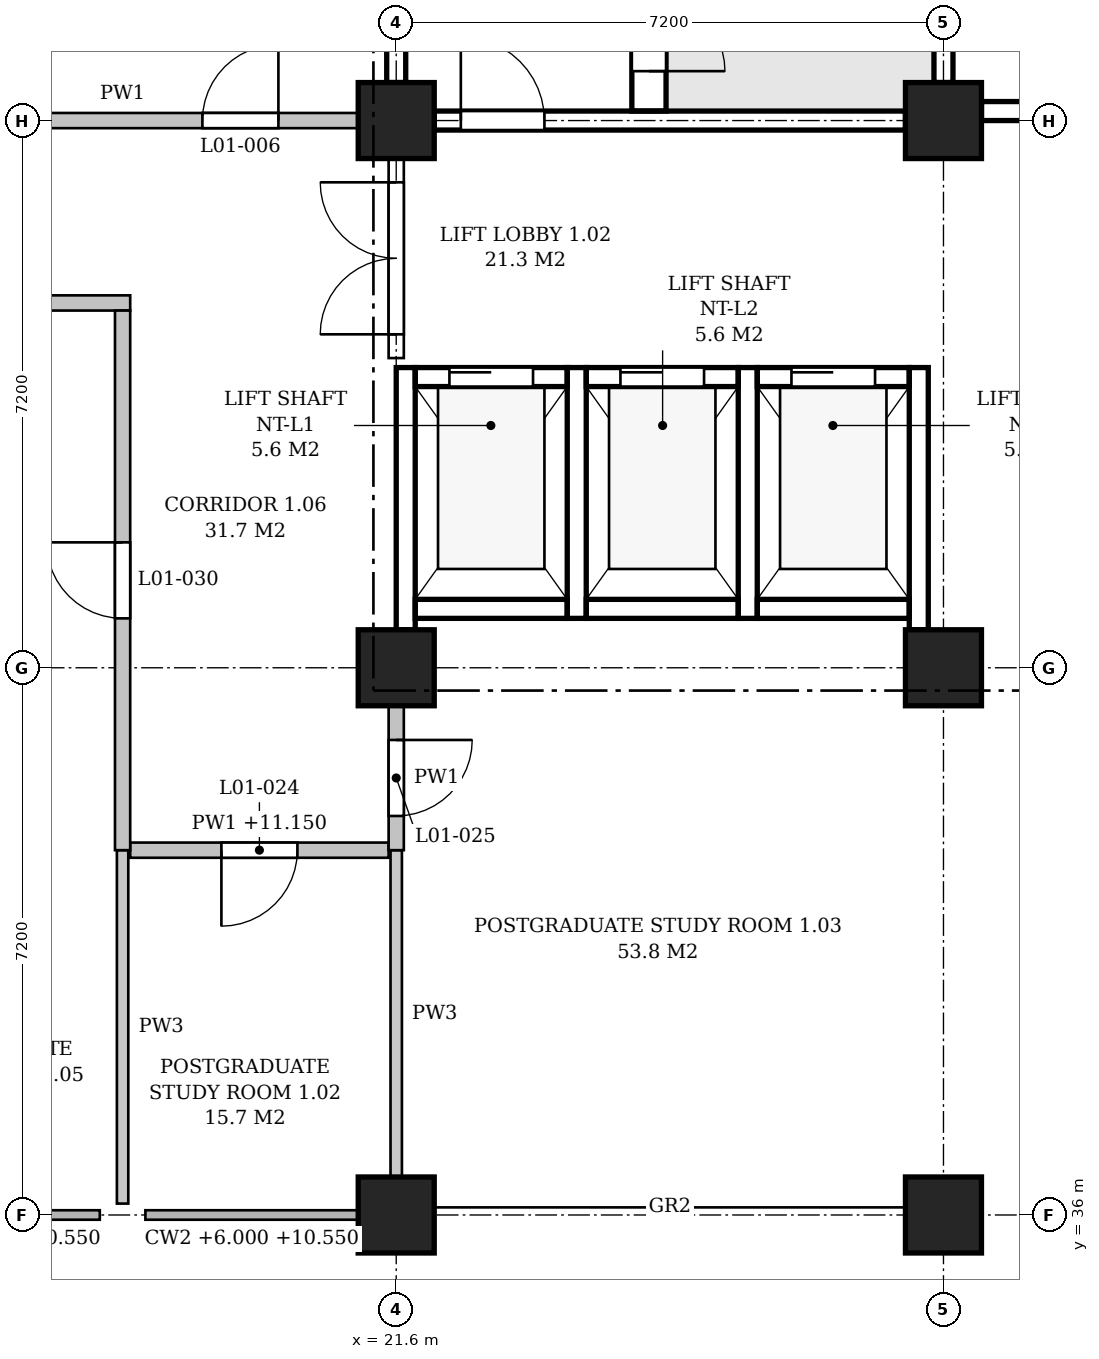
"""IFC4 building model, lengths in metres.
Left out: names, types, materials, properties, quantities, classifications, styles, units other than length and angle.
Written with IfcOpenShell. Run it as: python <this file> out.ifc"""

import sys

from ifc_helpers import new_model, si_unit, direction, frame, frame_2d, origin, origin_2d, place, context, subcontext, project, spatial, polyline, rectangle, outline, extrude, element, fill, save


model = new_model("IFC4")
c1 = context("Model", 3, precision=1e-05, world=origin(), true_north=direction((0.0, 1.0)))
c2 = subcontext(c1, "Body", "Model", "MODEL_VIEW")
j1 = project(units=[si_unit("LENGTHUNIT", "METRE"), si_unit("PLANEANGLEUNIT", "RADIAN")], contexts=[c1])
p1 = place(None, origin())
s1 = spatial("IfcSite", under=j1, at=p1, CompositionType="ELEMENT")
p2 = place(p1, origin())
s2 = spatial("IfcBuilding", under=s1, at=p2, CompositionType="ELEMENT")
p3 = place(p2, frame((0.0, 0.0, 6.0)))
s3 = spatial("IfcBuildingStorey", under=s2, at=p3, CompositionType="ELEMENT", Elevation=6.0)
for number, where, z_axis, x_axis in (
    (1, (21.6, 36.0, 0.0), (0.0, 0.0, 1.0), (1.0, 0.0, 0.0)),
    (2, (21.6, 43.2, 0.0), (0.0, 0.0, 1.0), (1.0, 0.0, 0.0)),
    (3, (21.6, 50.4, 0.0), (0.0, 0.0, 1.0), (1.0, 0.0, 0.0)),
    (4, (28.8, 36.0, 0.0), (0.0, 0.0, 1.0), (1.0, 0.0, 0.0)),
    (5, (28.8, 43.2, 0.0), (0.0, 0.0, 1.0), (1.0, 0.0, 0.0)),
    (6, (28.8, 50.4, 0.0), (0.0, 0.0, 1.0), (1.0, 0.0, 0.0)),
):
    element("IfcColumn", number, at=place(p3, frame(where, z_axis=z_axis, x_axis=x_axis)), inside=s3, PredefinedType="COLUMN", context=c2, shape_type="SweptSolid", body=[
        extrude(rectangle(XDim=1.0, YDim=1.0, at=origin_2d()), origin(), (0.0, 0.0, 1.0), 5.4),
    ])
p4 = place(p3, frame((29.3, 50.525, 0.0), z_axis=(0.0, 0.0, 1.0), x_axis=(1.0, 0.0, 0.0)))
e7 = element("IfcWall", 7, at=p4, inside=s3, PredefinedType="SHEAR", context=c2, shape_type="SweptSolid", body=[
    extrude(rectangle(XDim=6.275, YDim=0.25, at=frame_2d((3.137, 0.0))), origin(), (0.0, 0.0, 1.0), 4.7),
])
p5 = place(p3, frame((28.8, 50.9, -0.25), z_axis=(0.0, 0.0, 1.0), x_axis=(0.0, 1.0, 0.0)))
e8 = element("IfcWall", 8, at=p5, inside=s3, PredefinedType="SHEAR", context=c2, shape_type="SweptSolid", body=[
    extrude(rectangle(XDim=6.2, YDim=0.25, at=frame_2d((3.1, 0.0))), origin(), (0.0, 0.0, 1.0), 4.8),
])
p6 = place(p3, frame((22.1, 50.4, 0.0), z_axis=(0.0, 0.0, 1.0), x_axis=(1.0, 0.0, 0.0)))
e9 = element("IfcWall", 9, at=p6, inside=s3, PredefinedType="SHEAR", context=c2, shape_type="SweptSolid", body=[
    extrude(rectangle(XDim=6.2, YDim=0.25, at=frame_2d((3.1, 0.0))), origin(), (0.0, 0.0, 1.0), 4.4),
])
p7 = place(p6, frame((0.35, 0.0, 0.0)))
e10 = element("IfcOpeningElement", 10, at=p7, cuts=e9, PredefinedType="OPENING", context=c2, shape_type="SweptSolid", body=[
    extrude(rectangle(XDim=1.1, YDim=2.1, at=frame_2d((0.55, 1.05))), frame((0.0, 0.135, 0.0), z_axis=(0.0, -1.0, 0.0), x_axis=(1.0, 0.0, 0.0)), (0.0, 0.0, 1.0), 0.27),
])
p8 = place(p3, frame((21.6, 50.9, 0.0), z_axis=(0.0, 0.0, 1.0), x_axis=(0.0, 1.0, 0.0)))
e11 = element("IfcWall", 11, at=p8, inside=s3, PredefinedType="SHEAR", context=c2, shape_type="SweptSolid", body=[
    extrude(rectangle(XDim=6.2, YDim=0.25, at=frame_2d((3.1, 0.0))), origin(), (0.0, 0.0, 1.0), 4.4),
])
p9 = place(p3, frame((24.925, 50.525, 0.0), z_axis=(0.0, 0.0, 1.0), x_axis=(0.0, 1.0, 0.0)))
e12 = element("IfcWall", 12, at=p9, inside=s3, PredefinedType="SHEAR", context=c2, shape_type="SweptSolid", body=[
    extrude(rectangle(XDim=6.925, YDim=0.45, at=frame_2d((3.462, 0.0))), origin(), (0.0, 0.0, 1.0), 5.15),
])
p10 = place(p9, frame((0.525, 0.0, 0.0)))
e13 = element("IfcOpeningElement", 13, at=p10, cuts=e12, PredefinedType="OPENING", context=c2, shape_type="SweptSolid", body=[
    extrude(rectangle(XDim=1.0, YDim=2.1, at=frame_2d((0.5, 1.05))), frame((0.0, 0.235, 0.0), z_axis=(0.0, -1.0, 0.0), x_axis=(1.0, 0.0, 0.0)), (0.0, 0.0, 1.0), 0.47),
])
p11 = place(p3, frame((21.725, 43.7, -0.25), z_axis=(0.0, 0.0, 1.0), x_axis=(0.0, 1.0, 0.0)))
e14 = element("IfcWall", 14, at=p11, inside=s3, PredefinedType="SHEAR", context=c2, shape_type="SweptSolid", body=[
    extrude(rectangle(XDim=3.45, YDim=0.25, at=frame_2d((1.725, 0.0))), origin(), (0.0, 0.0, 1.0), 4.65),
])
for number, where, z_axis, x_axis in (
    (15, (23.975, 43.85, -0.25), (0.0, 0.0, 1.0), (0.0, 1.0, 0.0)),
    (16, (26.225, 43.85, -0.25), (0.0, 0.0, 1.0), (0.0, 1.0, 0.0)),
):
    element("IfcWall", number, at=place(p3, frame(where, z_axis=z_axis, x_axis=x_axis)), inside=s3, PredefinedType="SHEAR", context=c2, shape_type="SweptSolid", body=[
        extrude(rectangle(XDim=3.3, YDim=0.25, at=frame_2d((1.65, 0.0))), origin(), (0.0, 0.0, 1.0), 5.4),
    ])
p12 = place(p3, frame((28.475, 43.7, -0.25), z_axis=(0.0, 0.0, 1.0), x_axis=(0.0, 1.0, 0.0)))
e17 = element("IfcWall", 17, at=p12, inside=s3, PredefinedType="SHEAR", context=c2, shape_type="SweptSolid", body=[
    extrude(rectangle(XDim=3.45, YDim=0.25, at=frame_2d((1.725, 0.0))), origin(), (0.0, 0.0, 1.0), 5.4),
])
p13 = place(p3, frame((21.85, 47.025, -0.25), z_axis=(0.0, 0.0, 1.0), x_axis=(1.0, 0.0, 0.0)))
e18 = element("IfcWall", 18, at=p13, inside=s3, PredefinedType="SHEAR", context=c2, shape_type="SweptSolid", body=[
    extrude(rectangle(XDim=2.0, YDim=0.25, at=frame_2d((1.0, 0.0))), origin(), (0.0, 0.0, 1.0), 5.4),
])
p14 = place(p13, frame((0.45, 0.0, 0.25)))
e19 = element("IfcOpeningElement", 19, at=p14, cuts=e18, PredefinedType="OPENING", context=c2, shape_type="SweptSolid", body=[
    extrude(rectangle(XDim=1.1, YDim=2.1, at=frame_2d((0.55, 1.05))), frame((0.0, 0.135, 0.0), z_axis=(0.0, -1.0, 0.0), x_axis=(1.0, 0.0, 0.0)), (0.0, 0.0, 1.0), 0.27),
])
p15 = place(p3, frame((21.85, 43.975, -0.25), z_axis=(0.0, 0.0, 1.0), x_axis=(1.0, 0.0, 0.0)))
e20 = element("IfcWall", 20, at=p15, inside=s3, PredefinedType="SHEAR", context=c2, shape_type="SweptSolid", body=[
    extrude(rectangle(XDim=2.0, YDim=0.25, at=frame_2d((1.0, 0.0))), origin(), (0.0, 0.0, 1.0), 5.4),
])
p16 = place(p3, frame((24.1, 47.025, -0.25), z_axis=(0.0, 0.0, 1.0), x_axis=(1.0, 0.0, 0.0)))
e21 = element("IfcWall", 21, at=p16, inside=s3, PredefinedType="SHEAR", context=c2, shape_type="SweptSolid", body=[
    extrude(rectangle(XDim=2.0, YDim=0.25, at=frame_2d((1.0, 0.0))), origin(), (0.0, 0.0, 1.0), 5.4),
])
p17 = place(p16, frame((0.45, 0.0, 0.25)))
e22 = element("IfcOpeningElement", 22, at=p17, cuts=e21, PredefinedType="OPENING", context=c2, shape_type="SweptSolid", body=[
    extrude(rectangle(XDim=1.1, YDim=2.1, at=frame_2d((0.55, 1.05))), frame((0.0, 0.135, 0.0), z_axis=(0.0, -1.0, 0.0), x_axis=(1.0, 0.0, 0.0)), (0.0, 0.0, 1.0), 0.27),
])
p18 = place(p3, frame((24.1, 43.975, -0.25), z_axis=(0.0, 0.0, 1.0), x_axis=(1.0, 0.0, 0.0)))
e23 = element("IfcWall", 23, at=p18, inside=s3, PredefinedType="SHEAR", context=c2, shape_type="SweptSolid", body=[
    extrude(rectangle(XDim=2.0, YDim=0.25, at=frame_2d((1.0, 0.0))), origin(), (0.0, 0.0, 1.0), 5.4),
])
p19 = place(p3, frame((26.35, 47.025, -0.25), z_axis=(0.0, 0.0, 1.0), x_axis=(1.0, 0.0, 0.0)))
e24 = element("IfcWall", 24, at=p19, inside=s3, PredefinedType="SHEAR", context=c2, shape_type="SweptSolid", body=[
    extrude(rectangle(XDim=2.0, YDim=0.25, at=frame_2d((1.0, 0.0))), origin(), (0.0, 0.0, 1.0), 5.4),
])
p20 = place(p19, frame((0.45, 0.0, 0.25)))
e25 = element("IfcOpeningElement", 25, at=p20, cuts=e24, PredefinedType="OPENING", context=c2, shape_type="SweptSolid", body=[
    extrude(rectangle(XDim=1.1, YDim=2.1, at=frame_2d((0.55, 1.05))), frame((0.0, 0.135, 0.0), z_axis=(0.0, -1.0, 0.0), x_axis=(1.0, 0.0, 0.0)), (0.0, 0.0, 1.0), 0.27),
])
p21 = place(p3, frame((26.35, 43.975, -0.25), z_axis=(0.0, 0.0, 1.0), x_axis=(1.0, 0.0, 0.0)))
e26 = element("IfcWall", 26, at=p21, inside=s3, PredefinedType="SHEAR", context=c2, shape_type="SweptSolid", body=[
    extrude(rectangle(XDim=2.0, YDim=0.25, at=frame_2d((1.0, 0.0))), origin(), (0.0, 0.0, 1.0), 5.4),
])
p22 = place(p2, origin())
s4 = spatial("IfcBuildingStorey", under=s2, at=p22, CompositionType="ELEMENT", Elevation=0.0)
for number, where, z_axis, x_axis in (
    (27, (29.3, 36.2, 0.0), (0.0, 0.0, 1.0), (1.0, 0.0, 0.0)),
    (28, (29.3, 50.2, 0.0), (0.0, 0.0, 1.0), (1.0, 0.0, 0.0)),
):
    element("IfcWall", number, at=place(p22, frame(where, z_axis=z_axis, x_axis=x_axis)), inside=s4, PredefinedType="SOLIDWALL", context=c2, shape_type="SweptSolid", body=[
        extrude(rectangle(XDim=6.275, YDim=0.4, at=frame_2d((3.137, 0.0))), origin(), (0.0, 0.0, 1.0), 10.7),
    ])
for number, where, z_axis, x_axis in (
    (29, (29.0, 36.5, 0.0), (0.0, 0.0, 1.0), (0.0, 1.0, 0.0)),
    (30, (29.0, 43.7, 0.0), (0.0, 0.0, 1.0), (0.0, 1.0, 0.0)),
):
    element("IfcWall", number, at=place(p22, frame(where, z_axis=z_axis, x_axis=x_axis)), inside=s4, PredefinedType="SOLIDWALL", context=c2, shape_type="SweptSolid", body=[
        extrude(rectangle(XDim=6.2, YDim=0.4, at=frame_2d((3.1, 0.0))), origin(), (0.0, 0.0, 1.0), 10.55),
    ])
p23 = place(p3, frame((18.1, 40.8, 0.0), z_axis=(0.0, 0.0, 1.0), x_axis=(1.0, 0.0, 0.0)))
e31 = element("IfcWall", 31, at=p23, inside=s3, PredefinedType="PARTITIONING", context=c2, shape_type="SweptSolid", body=[
    extrude(outline(polyline([(0.0, 0.0), (3.4, 0.0), (3.4, 4.4), (3.25, 4.4), (3.25, 5.15), (0.0, 5.15), (0.0, 0.0)])), frame((0.0, 0.1, 0.0), z_axis=(0.0, -1.0, 0.0), x_axis=(1.0, 0.0, 0.0)), (0.0, 0.0, 1.0), 0.2),
])
p24 = place(p23, frame((1.2, 0.0, 0.0)))
e32 = element("IfcOpeningElement", 32, at=p24, cuts=e31, PredefinedType="OPENING", context=c2, shape_type="SweptSolid", body=[
    extrude(rectangle(XDim=1.0, YDim=2.1, at=frame_2d((0.5, 1.05))), frame((0.0, 0.11, 0.0), z_axis=(0.0, -1.0, 0.0), x_axis=(1.0, 0.0, 0.0)), (0.0, 0.0, 1.0), 0.22),
])
p25 = place(p3, frame((3.5, 48.0, 0.0), z_axis=(0.0, 0.0, 1.0), x_axis=(1.0, 0.0, 0.0)))
e33 = element("IfcWall", 33, at=p25, inside=s3, PredefinedType="PARTITIONING", context=c2, shape_type="SweptSolid", body=[
    extrude(outline(polyline([(0.0, 0.0), (14.6, 0.0), (14.6, 5.15), (11.15, 5.15), (11.15, 4.4), (10.65, 4.4), (10.65, 5.15), (3.95, 5.15), (3.95, 4.4), (3.45, 4.4), (3.45, 5.15), (0.0, 5.15), (0.0, 0.0)])), frame((0.0, 0.1, 0.0), z_axis=(0.0, -1.0, 0.0), x_axis=(1.0, 0.0, 0.0)), (0.0, 0.0, 1.0), 0.2),
])
p26 = place(p25, frame((1.4, 0.0, 0.0)))
e34 = element("IfcOpeningElement", 34, at=p26, cuts=e33, PredefinedType="OPENING", context=c2, shape_type="SweptSolid", body=[
    extrude(rectangle(XDim=1.0, YDim=2.1, at=frame_2d((0.5, 1.05))), frame((0.0, 0.11, 0.0), z_axis=(0.0, -1.0, 0.0), x_axis=(1.0, 0.0, 0.0)), (0.0, 0.0, 1.0), 0.22),
])
p27 = place(p25, frame((6.3, 0.0, 0.0)))
e35 = element("IfcOpeningElement", 35, at=p27, cuts=e33, PredefinedType="OPENING", context=c2, shape_type="SweptSolid", body=[
    extrude(rectangle(XDim=2.0, YDim=2.1, at=frame_2d((1.0, 1.05))), frame((0.0, 0.11, 0.0), z_axis=(0.0, -1.0, 0.0), x_axis=(1.0, 0.0, 0.0)), (0.0, 0.0, 1.0), 0.22),
])
p28 = place(p25, frame((3.95, 0.0, 0.0)))
e36 = element("IfcOpeningElement", 36, at=p28, cuts=e33, PredefinedType="OPENING", context=c2, shape_type="SweptSolid", body=[
    extrude(rectangle(XDim=2.0, YDim=2.1, at=frame_2d((1.0, 1.05))), frame((0.0, 0.11, 0.0), z_axis=(0.0, -1.0, 0.0), x_axis=(1.0, 0.0, 0.0)), (0.0, 0.0, 1.0), 0.22),
])
p29 = place(p3, frame((14.9, 50.4, 0.0), z_axis=(0.0, 0.0, 1.0), x_axis=(1.0, 0.0, 0.0)))
e37 = element("IfcWall", 37, at=p29, inside=s3, PredefinedType="PARTITIONING", context=c2, shape_type="SweptSolid", body=[
    extrude(rectangle(XDim=6.2, YDim=0.2, at=frame_2d((3.1, 0.0))), origin(), (0.0, 0.0, 1.0), 4.4),
])
p30 = place(p29, frame((4.15, 0.0, 0.0)))
e38 = element("IfcOpeningElement", 38, at=p30, cuts=e37, PredefinedType="OPENING", context=c2, shape_type="SweptSolid", body=[
    extrude(rectangle(XDim=1.0, YDim=2.1, at=frame_2d((0.5, 1.05))), frame((0.0, 0.11, 0.0), z_axis=(0.0, -1.0, 0.0), x_axis=(1.0, 0.0, 0.0)), (0.0, 0.0, 1.0), 0.22),
])
p31 = place(p3, frame((18.0, 36.15, 0.0), z_axis=(0.0, 0.0, 1.0), x_axis=(0.0, 1.0, 0.0)))
e39 = element("IfcWall", 39, at=p31, inside=s3, PredefinedType="PARTITIONING", context=c2, shape_type="SweptSolid", body=[
    extrude(rectangle(XDim=4.65, YDim=0.15, at=frame_2d((2.325, 0.0))), origin(), (0.0, 0.0, 1.0), 4.4),
])
p32 = place(p3, frame((18.0, 40.8, 0.0), z_axis=(0.0, 0.0, 1.0), x_axis=(0.0, 1.0, 0.0)))
e40 = element("IfcWall", 40, at=p32, inside=s3, PredefinedType="PARTITIONING", context=c2, shape_type="SweptSolid", body=[
    extrude(outline(polyline([(0.0, 0.0), (7.1, 0.0), (7.1, 5.15), (2.65, 5.15), (2.65, 4.4), (2.15, 4.4), (2.15, 5.15), (0.0, 5.15), (0.0, 0.0)])), frame((0.0, 0.1, 0.0), z_axis=(0.0, -1.0, 0.0), x_axis=(1.0, 0.0, 0.0)), (0.0, 0.0, 1.0), 0.2),
])
p33 = place(p32, frame((3.05, 0.0, 0.0)))
e41 = element("IfcOpeningElement", 41, at=p33, cuts=e40, PredefinedType="OPENING", context=c2, shape_type="SweptSolid", body=[
    extrude(rectangle(XDim=1.0, YDim=2.1, at=frame_2d((0.5, 1.05))), frame((0.0, 0.11, 0.0), z_axis=(0.0, -1.0, 0.0), x_axis=(1.0, 0.0, 0.0)), (0.0, 0.0, 1.0), 0.22),
])
p34 = place(p3, frame((21.6, 36.5, 0.0), z_axis=(0.0, 0.0, 1.0), x_axis=(0.0, 1.0, 0.0)))
e42 = element("IfcWall", 42, at=p34, inside=s3, PredefinedType="PARTITIONING", context=c2, shape_type="SweptSolid", body=[
    extrude(rectangle(XDim=4.3, YDim=0.15, at=frame_2d((2.15, 0.0))), origin(), (0.0, 0.0, 1.0), 4.4),
])
p35 = place(p3, frame((21.6, 40.8, 0.0), z_axis=(0.0, 0.0, 1.0), x_axis=(0.0, 1.0, 0.0)))
e43 = element("IfcWall", 43, at=p35, inside=s3, PredefinedType="PARTITIONING", context=c2, shape_type="SweptSolid", body=[
    extrude(rectangle(XDim=1.9, YDim=0.2, at=frame_2d((0.95, 0.0))), origin(), (0.0, 0.0, 1.0), 4.4),
])
p36 = place(p35, frame((0.45, 0.0, 0.0)))
e44 = element("IfcOpeningElement", 44, at=p36, cuts=e43, PredefinedType="OPENING", context=c2, shape_type="SweptSolid", body=[
    extrude(rectangle(XDim=1.0, YDim=2.1, at=frame_2d((0.5, 1.05))), frame((0.0, 0.11, 0.0), z_axis=(0.0, -1.0, 0.0), x_axis=(1.0, 0.0, 0.0)), (0.0, 0.0, 1.0), 0.22),
])
p37 = place(p3, frame((21.6, 47.275, 0.0), z_axis=(0.0, 0.0, 1.0), x_axis=(0.0, 1.0, 0.0)))
e45 = element("IfcWall", 45, at=p37, inside=s3, PredefinedType="PARTITIONING", context=c2, shape_type="SweptSolid", body=[
    extrude(rectangle(XDim=2.625, YDim=0.2, at=frame_2d((1.312, 0.0))), origin(), (0.0, 0.0, 1.0), 4.4),
])
p38 = place(p37, frame((0.312, 0.0, 0.0)))
e46 = element("IfcOpeningElement", 46, at=p38, cuts=e45, PredefinedType="OPENING", context=c2, shape_type="SweptSolid", body=[
    extrude(rectangle(XDim=2.0, YDim=2.4, at=frame_2d((1.0, 1.2))), frame((0.0, 0.11, 0.0), z_axis=(0.0, -1.0, 0.0), x_axis=(1.0, 0.0, 0.0)), (0.0, 0.0, 1.0), 0.22),
])
p39 = place(p10, frame((1.0, 0.0, 0.0), z_axis=(0.0, 0.0, 1.0), x_axis=(-1.0, 0.0, 0.0)))
e47 = element("IfcDoor", 47, at=p39, inside=s3, OperationType="SINGLE_SWING_RIGHT", PredefinedType="DOOR", context=c2, shape_type="SweptSolid", body=[
    extrude(rectangle(XDim=1.0, YDim=2.1, at=frame_2d((0.5, 1.05))), frame((0.0, 0.025, 0.0), z_axis=(0.0, -1.0, 0.0), x_axis=(1.0, 0.0, 0.0)), (0.0, 0.0, 1.0), 0.05),
])
fill(e13, e47)
p40 = place(p7, origin())
e48 = element("IfcDoor", 48, at=p40, inside=s3, OperationType="SINGLE_SWING_LEFT", PredefinedType="DOOR", context=c2, shape_type="SweptSolid", body=[
    extrude(rectangle(XDim=1.1, YDim=2.1, at=frame_2d((0.55, 1.05))), frame((0.0, 0.025, 0.0), z_axis=(0.0, -1.0, 0.0), x_axis=(1.0, 0.0, 0.0)), (0.0, 0.0, 1.0), 0.05),
])
fill(e10, e48)
p41 = place(p14, origin())
e49 = element("IfcDoor", 49, at=p41, inside=s3, OperationType="SLIDING_TO_LEFT", PredefinedType="DOOR", context=c2, shape_type="SweptSolid", body=[
    extrude(rectangle(XDim=1.1, YDim=2.1, at=frame_2d((0.55, 1.05))), frame((0.0, 0.025, 0.0), z_axis=(0.0, -1.0, 0.0), x_axis=(1.0, 0.0, 0.0)), (0.0, 0.0, 1.0), 0.05),
])
fill(e19, e49)
p42 = place(p17, origin())
e50 = element("IfcDoor", 50, at=p42, inside=s3, OperationType="SLIDING_TO_LEFT", PredefinedType="DOOR", context=c2, shape_type="SweptSolid", body=[
    extrude(rectangle(XDim=1.1, YDim=2.1, at=frame_2d((0.55, 1.05))), frame((0.0, 0.025, 0.0), z_axis=(0.0, -1.0, 0.0), x_axis=(1.0, 0.0, 0.0)), (0.0, 0.0, 1.0), 0.05),
])
fill(e22, e50)
p43 = place(p20, origin())
e51 = element("IfcDoor", 51, at=p43, inside=s3, OperationType="SLIDING_TO_LEFT", PredefinedType="DOOR", context=c2, shape_type="SweptSolid", body=[
    extrude(rectangle(XDim=1.1, YDim=2.1, at=frame_2d((0.55, 1.05))), frame((0.0, 0.025, 0.0), z_axis=(0.0, -1.0, 0.0), x_axis=(1.0, 0.0, 0.0)), (0.0, 0.0, 1.0), 0.05),
])
fill(e25, e51)
p44 = place(p38, origin())
e52 = element("IfcDoor", 52, at=p44, inside=s3, OperationType="DOUBLE_DOOR_SINGLE_SWING", PredefinedType="DOOR", context=c2, shape_type="SweptSolid", body=[
    extrude(rectangle(XDim=2.0, YDim=2.4, at=frame_2d((1.0, 1.2))), frame((0.0, 0.025, 0.0), z_axis=(0.0, -1.0, 0.0), x_axis=(1.0, 0.0, 0.0)), (0.0, 0.0, 1.0), 0.05),
])
fill(e46, e52)
p45 = place(p30, origin())
e53 = element("IfcDoor", 53, at=p45, inside=s3, OperationType="SINGLE_SWING_RIGHT", PredefinedType="DOOR", context=c2, shape_type="SweptSolid", body=[
    extrude(rectangle(XDim=1.0, YDim=2.1, at=frame_2d((0.5, 1.05))), frame((0.0, 0.025, 0.0), z_axis=(0.0, -1.0, 0.0), x_axis=(1.0, 0.0, 0.0)), (0.0, 0.0, 1.0), 0.05),
])
fill(e38, e53)
p46 = place(p24, frame((1.0, 0.0, 0.0), z_axis=(0.0, 0.0, 1.0), x_axis=(-1.0, 0.0, 0.0)))
e54 = element("IfcDoor", 54, at=p46, inside=s3, OperationType="SINGLE_SWING_RIGHT", PredefinedType="DOOR", context=c2, shape_type="SweptSolid", body=[
    extrude(rectangle(XDim=1.0, YDim=2.1, at=frame_2d((0.5, 1.05))), frame((0.0, 0.025, 0.0), z_axis=(0.0, -1.0, 0.0), x_axis=(1.0, 0.0, 0.0)), (0.0, 0.0, 1.0), 0.05),
])
fill(e32, e54)
p47 = place(p36, frame((1.0, 0.0, 0.0), z_axis=(0.0, 0.0, 1.0), x_axis=(-1.0, 0.0, 0.0)))
e55 = element("IfcDoor", 55, at=p47, inside=s3, OperationType="SINGLE_SWING_LEFT", PredefinedType="DOOR", context=c2, shape_type="SweptSolid", body=[
    extrude(rectangle(XDim=1.0, YDim=2.1, at=frame_2d((0.5, 1.05))), frame((0.0, 0.025, 0.0), z_axis=(0.0, -1.0, 0.0), x_axis=(1.0, 0.0, 0.0)), (0.0, 0.0, 1.0), 0.05),
])
fill(e44, e55)
p48 = place(p33, origin())
e56 = element("IfcDoor", 56, at=p48, inside=s3, OperationType="SINGLE_SWING_RIGHT", PredefinedType="DOOR", context=c2, shape_type="SweptSolid", body=[
    extrude(rectangle(XDim=1.0, YDim=2.1, at=frame_2d((0.5, 1.05))), frame((0.0, 0.025, 0.0), z_axis=(0.0, -1.0, 0.0), x_axis=(1.0, 0.0, 0.0)), (0.0, 0.0, 1.0), 0.05),
])
fill(e41, e56)
save(model, sys.argv[1])
